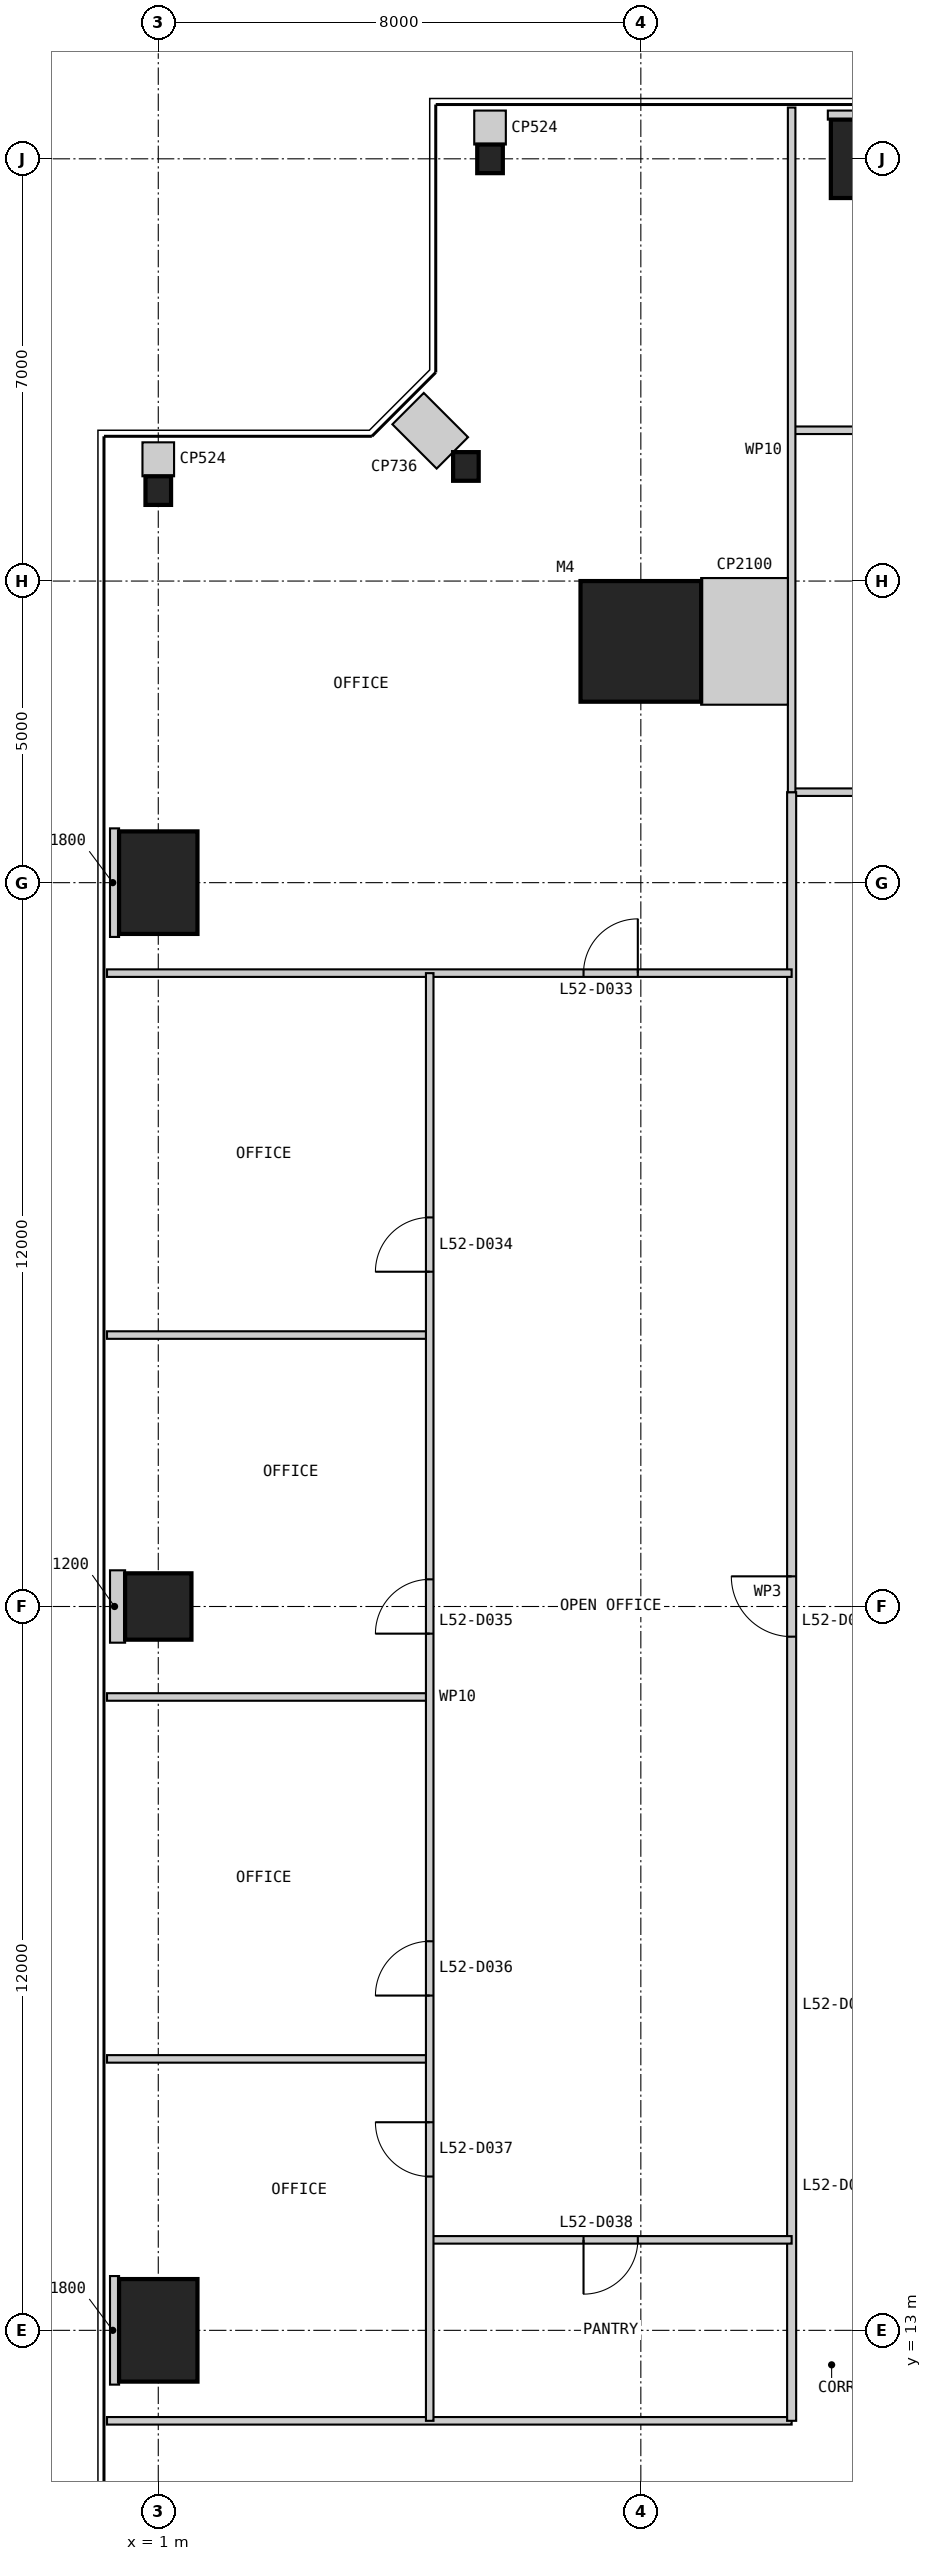
"""IFC4 building model, lengths in metres.
Left out: names, types, materials, properties, quantities, classifications, styles, units other than length and angle.
Written with IfcOpenShell. Run it as: python <this file> out.ifc"""

import sys

from ifc_helpers import new_model, si_unit, direction, frame, frame_2d, origin, origin_2d, place, context, subcontext, project, spatial, rectangle, i_section, extrude, element, fill, save


model = new_model("IFC4")
c1 = context("Model", 3, precision=1e-05, world=origin(), true_north=direction((0.0, 1.0)))
c2 = subcontext(c1, "Body", "Model", "MODEL_VIEW")
j1 = project(units=[si_unit("LENGTHUNIT", "METRE"), si_unit("PLANEANGLEUNIT", "RADIAN")], contexts=[c1])
p1 = place(None, origin())
s1 = spatial("IfcSite", under=j1, at=p1, CompositionType="ELEMENT")
p2 = place(p1, origin())
s2 = spatial("IfcBuilding", under=s1, at=p2, CompositionType="ELEMENT")
p3 = place(p2, frame((0.0, 0.0, 221.8)))
s3 = spatial("IfcBuildingStorey", under=s2, at=p3, CompositionType="ELEMENT", Elevation=221.8)
p4 = place(p3, frame((9.0, 41.0, 0.0), z_axis=(0.0, 0.0, 1.0), x_axis=(1.0, 0.0, 0.0)))
e1 = element("IfcColumn", 1, at=p4, inside=s3, PredefinedType="COLUMN", context=c2, shape_type="SweptSolid", body=[
    extrude(rectangle(XDim=2.0, YDim=2.0, at=origin_2d()), origin(), (0.0, 0.0, 1.0), 4.0),
])
p5 = place(p3, frame((13.0, 49.0, 0.0), z_axis=(0.0, 0.0, 1.0), x_axis=(1.0, 0.0, 0.0)))
e2 = element("IfcColumn", 2, at=p5, inside=s3, PredefinedType="COLUMN", context=c2, shape_type="SweptSolid", body=[
    extrude(rectangle(XDim=1.7, YDim=1.3, at=origin_2d()), origin(), (0.0, 0.0, 1.0), 4.0),
])
for number, where, z_axis, x_axis in (
    (3, (6.5, 49.0, 0.0), (0.0, 0.0, 1.0), (1.0, 0.0, 0.0)),
    (4, (6.1, 43.9, 0.0), (0.0, 0.0, 1.0), (1.0, 0.0, 0.0)),
    (5, (1.0, 43.5, 0.0), (0.0, 0.0, 1.0), (1.0, 0.0, 0.0)),
):
    element("IfcColumn", number, at=place(p3, frame(where, z_axis=z_axis, x_axis=x_axis)), inside=s3, PredefinedType="COLUMN", context=c2, shape_type="SweptSolid", body=[
        extrude(i_section(OverallWidth=0.424, OverallDepth=0.475, WebThickness=0.048, FlangeThickness=0.077, at=origin_2d()), origin(), (0.0, 0.0, 1.0), 4.0),
    ])
p6 = place(p3, frame((1.0, 37.0, 0.0), z_axis=(0.0, 0.0, 1.0), x_axis=(1.0, 0.0, 0.0)))
e6 = element("IfcColumn", 6, at=p6, inside=s3, PredefinedType="COLUMN", context=c2, shape_type="SweptSolid", body=[
    extrude(rectangle(XDim=1.3, YDim=1.7, at=origin_2d()), origin(), (0.0, 0.0, 1.0), 4.0),
])
p7 = place(p3, frame((1.0, 25.0, 0.0), z_axis=(0.0, 0.0, 1.0), x_axis=(1.0, 0.0, 0.0)))
e7 = element("IfcColumn", 7, at=p7, inside=s3, PredefinedType="COLUMN", context=c2, shape_type="SweptSolid", body=[
    extrude(rectangle(XDim=1.1, YDim=1.1, at=origin_2d()), origin(), (0.0, 0.0, 1.0), 4.0),
])
p8 = place(p3, frame((1.0, 13.0, 0.0), z_axis=(0.0, 0.0, 1.0), x_axis=(1.0, 0.0, 0.0)))
e8 = element("IfcColumn", 8, at=p8, inside=s3, PredefinedType="COLUMN", context=c2, shape_type="SweptSolid", body=[
    extrude(rectangle(XDim=1.3, YDim=1.7, at=origin_2d()), origin(), (0.0, 0.0, 1.0), 4.0),
])
p9 = place(p3, frame((0.15, 11.5, 0.0), z_axis=(0.0, 0.0, 1.0), x_axis=(1.0, 0.0, 0.0)))
e9 = element("IfcWall", 9, at=p9, inside=s3, PredefinedType="PARTITIONING", context=c2, shape_type="SweptSolid", body=[
    extrude(rectangle(XDim=11.35, YDim=0.125, at=frame_2d((5.675, 0.0))), origin(), (0.0, 0.0, 1.0), 3.85),
])
p10 = place(p3, frame((17.5, 44.5, 0.0), z_axis=(0.0, 0.0, 1.0), x_axis=(-1.0, 0.0, 0.0)))
e10 = element("IfcWall", 10, at=p10, inside=s3, PredefinedType="PARTITIONING", context=c2, shape_type="SweptSolid", body=[
    extrude(rectangle(XDim=6.0, YDim=0.125, at=frame_2d((3.0, 0.0))), origin(), (0.0, 0.0, 1.0), 3.85),
])
p11 = place(p3, frame((14.5, 38.5, 0.0), z_axis=(0.0, 0.0, 1.0), x_axis=(-1.0, 0.0, 0.0)))
e11 = element("IfcWall", 11, at=p11, inside=s3, PredefinedType="PARTITIONING", context=c2, shape_type="SweptSolid", body=[
    extrude(rectangle(XDim=3.0, YDim=0.125, at=frame_2d((1.5, 0.0))), origin(), (0.0, 0.0, 1.0), 3.85),
])
p12 = place(p3, frame((11.5, 38.5, 0.0), z_axis=(0.0, 0.0, 1.0), x_axis=(0.0, -1.0, 0.0)))
e12 = element("IfcWall", 12, at=p12, inside=s3, PredefinedType="PARTITIONING", context=c2, shape_type="SweptSolid", body=[
    extrude(rectangle(XDim=27.0, YDim=0.15, at=frame_2d((13.5, 0.0))), origin(), (0.0, 0.0, 1.0), 3.85),
])
p13 = place(p12, frame((13.0, 0.0, 0.0)))
e13 = element("IfcOpeningElement", 13, at=p13, cuts=e12, PredefinedType="OPENING", context=c2, shape_type="SweptSolid", body=[
    extrude(rectangle(XDim=1.0, YDim=2.2, at=frame_2d((0.5, 1.1))), frame((0.0, 0.085, 0.0), z_axis=(0.0, -1.0, 0.0), x_axis=(1.0, 0.0, 0.0)), (0.0, 0.0, 1.0), 0.17),
])
p14 = place(p3, frame((11.5, 49.85, 0.0), z_axis=(0.0, 0.0, 1.0), x_axis=(0.0, -1.0, 0.0)))
e14 = element("IfcWall", 14, at=p14, inside=s3, PredefinedType="PARTITIONING", context=c2, shape_type="SweptSolid", body=[
    extrude(rectangle(XDim=11.35, YDim=0.125, at=frame_2d((5.675, 0.0))), origin(), (0.0, 0.0, 1.0), 3.85),
])
p15 = place(p3, frame((0.15, 35.5, 0.0), z_axis=(0.0, 0.0, 1.0), x_axis=(1.0, 0.0, 0.0)))
e15 = element("IfcWall", 15, at=p15, inside=s3, PredefinedType="PARTITIONING", context=c2, shape_type="SweptSolid", body=[
    extrude(rectangle(XDim=11.35, YDim=0.125, at=frame_2d((5.675, 0.0))), origin(), (0.0, 0.0, 1.0), 3.85),
])
p16 = place(p15, frame((7.9, 0.0, 0.0)))
e16 = element("IfcOpeningElement", 16, at=p16, cuts=e15, PredefinedType="OPENING", context=c2, shape_type="SweptSolid", body=[
    extrude(rectangle(XDim=0.9, YDim=2.2, at=frame_2d((0.45, 1.1))), frame((0.0, 0.073, 0.0), z_axis=(0.0, -1.0, 0.0), x_axis=(1.0, 0.0, 0.0)), (0.0, 0.0, 1.0), 0.145),
])
for number, where, z_axis, x_axis in (
    (17, (0.15, 29.5, 0.0), (0.0, 0.0, 1.0), (1.0, 0.0, 0.0)),
    (18, (0.15, 23.5, 0.0), (0.0, 0.0, 1.0), (1.0, 0.0, 0.0)),
    (19, (0.15, 17.5, 0.0), (0.0, 0.0, 1.0), (1.0, 0.0, 0.0)),
):
    element("IfcWall", number, at=place(p3, frame(where, z_axis=z_axis, x_axis=x_axis)), inside=s3, PredefinedType="PARTITIONING", context=c2, shape_type="SweptSolid", body=[
        extrude(rectangle(XDim=5.35, YDim=0.125, at=frame_2d((2.675, 0.0))), origin(), (0.0, 0.0, 1.0), 3.85),
    ])
p17 = place(p3, frame((5.5, 14.5, 0.0), z_axis=(0.0, 0.0, 1.0), x_axis=(1.0, 0.0, 0.0)))
e20 = element("IfcWall", 20, at=p17, inside=s3, PredefinedType="PARTITIONING", context=c2, shape_type="SweptSolid", body=[
    extrude(rectangle(XDim=6.0, YDim=0.125, at=frame_2d((3.0, 0.0))), origin(), (0.0, 0.0, 1.0), 3.85),
])
p18 = place(p17, frame((2.55, 0.0, 0.0)))
e21 = element("IfcOpeningElement", 21, at=p18, cuts=e20, PredefinedType="OPENING", context=c2, shape_type="SweptSolid", body=[
    extrude(rectangle(XDim=0.9, YDim=2.2, at=frame_2d((0.45, 1.1))), frame((0.0, 0.073, 0.0), z_axis=(0.0, -1.0, 0.0), x_axis=(1.0, 0.0, 0.0)), (0.0, 0.0, 1.0), 0.145),
])
p19 = place(p3, frame((5.5, 35.5, 0.0), z_axis=(0.0, 0.0, 1.0), x_axis=(0.0, -1.0, 0.0)))
e22 = element("IfcWall", 22, at=p19, inside=s3, PredefinedType="PARTITIONING", context=c2, shape_type="SweptSolid", body=[
    extrude(rectangle(XDim=24.0, YDim=0.125, at=frame_2d((12.0, 0.0))), origin(), (0.0, 0.0, 1.0), 3.85),
])
p20 = place(p19, frame((4.05, 0.0, 0.0)))
e23 = element("IfcOpeningElement", 23, at=p20, cuts=e22, PredefinedType="OPENING", context=c2, shape_type="SweptSolid", body=[
    extrude(rectangle(XDim=0.9, YDim=2.2, at=frame_2d((0.45, 1.1))), frame((0.0, 0.073, 0.0), z_axis=(0.0, -1.0, 0.0), x_axis=(1.0, 0.0, 0.0)), (0.0, 0.0, 1.0), 0.145),
])
p21 = place(p19, frame((10.05, 0.0, 0.0)))
e24 = element("IfcOpeningElement", 24, at=p21, cuts=e22, PredefinedType="OPENING", context=c2, shape_type="SweptSolid", body=[
    extrude(rectangle(XDim=0.9, YDim=2.2, at=frame_2d((0.45, 1.1))), frame((0.0, 0.073, 0.0), z_axis=(0.0, -1.0, 0.0), x_axis=(1.0, 0.0, 0.0)), (0.0, 0.0, 1.0), 0.145),
])
p22 = place(p19, frame((16.05, 0.0, 0.0)))
e25 = element("IfcOpeningElement", 25, at=p22, cuts=e22, PredefinedType="OPENING", context=c2, shape_type="SweptSolid", body=[
    extrude(rectangle(XDim=0.9, YDim=2.2, at=frame_2d((0.45, 1.1))), frame((0.0, 0.073, 0.0), z_axis=(0.0, -1.0, 0.0), x_axis=(1.0, 0.0, 0.0)), (0.0, 0.0, 1.0), 0.145),
])
p23 = place(p19, frame((19.05, 0.0, 0.0)))
e26 = element("IfcOpeningElement", 26, at=p23, cuts=e22, PredefinedType="OPENING", context=c2, shape_type="SweptSolid", body=[
    extrude(rectangle(XDim=0.9, YDim=2.2, at=frame_2d((0.45, 1.1))), frame((0.0, 0.073, 0.0), z_axis=(0.0, -1.0, 0.0), x_axis=(1.0, 0.0, 0.0)), (0.0, 0.0, 1.0), 0.145),
])
p24 = place(p3, frame((13.0, 49.8, 0.0), z_axis=(0.0, 0.0, 1.0), x_axis=(0.0, -1.0, 0.0)))
e27 = element("IfcWall", 27, at=p24, inside=s3, PredefinedType="PARTITIONING", context=c2, shape_type="SweptSolid", body=[
    extrude(rectangle(XDim=0.15, YDim=1.8, at=frame_2d((0.075, 0.0))), origin(), (0.0, 0.0, 1.0), 3.85),
])
p25 = place(p3, frame((11.438, 41.0, 0.0), z_axis=(0.0, 0.0, 1.0), x_axis=(-1.0, 0.0, 0.0)))
e28 = element("IfcWall", 28, at=p25, inside=s3, PredefinedType="PARTITIONING", context=c2, shape_type="SweptSolid", body=[
    extrude(rectangle(XDim=1.438, YDim=2.1, at=frame_2d((0.719, 0.0))), origin(), (0.0, 0.0, 1.0), 3.85),
])
p26 = place(p3, frame((6.5, 49.8, 0.0), z_axis=(0.0, 0.0, 1.0), x_axis=(0.0, -1.0, 0.0)))
e29 = element("IfcWall", 29, at=p26, inside=s3, PredefinedType="PARTITIONING", context=c2, shape_type="SweptSolid", body=[
    extrude(rectangle(XDim=0.562, YDim=0.524, at=frame_2d((0.281, 0.0))), origin(), (0.0, 0.0, 1.0), 3.85),
])
p27 = place(p3, frame((5.141, 44.859, 0.0), z_axis=(0.0, 0.0, 1.0), x_axis=(0.707106781187, -0.707106781187, 0.0)))
e30 = element("IfcWall", 30, at=p27, inside=s3, PredefinedType="PARTITIONING", context=c2, shape_type="SweptSolid", body=[
    extrude(rectangle(XDim=1.038, YDim=0.736, at=frame_2d((0.519, 0.0))), origin(), (0.0, 0.0, 1.0), 3.85),
])
p28 = place(p3, frame((1.0, 44.3, 0.0), z_axis=(0.0, 0.0, 1.0), x_axis=(0.0, -1.0, 0.0)))
e31 = element("IfcWall", 31, at=p28, inside=s3, PredefinedType="PARTITIONING", context=c2, shape_type="SweptSolid", body=[
    extrude(rectangle(XDim=0.562, YDim=0.524, at=frame_2d((0.281, 0.0))), origin(), (0.0, 0.0, 1.0), 3.85),
])
p29 = place(p3, frame((0.2, 37.0, 0.0), z_axis=(0.0, 0.0, 1.0), x_axis=(1.0, 0.0, 0.0)))
e32 = element("IfcWall", 32, at=p29, inside=s3, PredefinedType="PARTITIONING", context=c2, shape_type="SweptSolid", body=[
    extrude(rectangle(XDim=0.15, YDim=1.8, at=frame_2d((0.075, 0.0))), origin(), (0.0, 0.0, 1.0), 3.85),
])
p30 = place(p3, frame((0.2, 25.0, 0.0), z_axis=(0.0, 0.0, 1.0), x_axis=(1.0, 0.0, 0.0)))
e33 = element("IfcWall", 33, at=p30, inside=s3, PredefinedType="PARTITIONING", context=c2, shape_type="SweptSolid", body=[
    extrude(rectangle(XDim=0.25, YDim=1.2, at=frame_2d((0.125, 0.0))), origin(), (0.0, 0.0, 1.0), 3.85),
])
p31 = place(p3, frame((0.2, 13.0, 0.0), z_axis=(0.0, 0.0, 1.0), x_axis=(1.0, 0.0, 0.0)))
e34 = element("IfcWall", 34, at=p31, inside=s3, PredefinedType="PARTITIONING", context=c2, shape_type="SweptSolid", body=[
    extrude(rectangle(XDim=0.15, YDim=1.8, at=frame_2d((0.075, 0.0))), origin(), (0.0, 0.0, 1.0), 3.85),
])
p32 = place(p13, frame((1.0, 0.0, 0.0), z_axis=(0.0, 0.0, 1.0), x_axis=(-1.0, 0.0, 0.0)))
e35 = element("IfcDoor", 35, at=p32, inside=s3, OperationType="SINGLE_SWING_RIGHT", PredefinedType="DOOR", context=c2, shape_type="SweptSolid", body=[
    extrude(rectangle(XDim=1.0, YDim=2.2, at=frame_2d((0.5, 1.1))), frame((0.0, 0.025, 0.0), z_axis=(0.0, -1.0, 0.0), x_axis=(1.0, 0.0, 0.0)), (0.0, 0.0, 1.0), 0.05),
])
fill(e13, e35)
p33 = place(p16, origin())
e36 = element("IfcDoor", 36, at=p33, inside=s3, OperationType="SINGLE_SWING_RIGHT", PredefinedType="DOOR", context=c2, shape_type="SweptSolid", body=[
    extrude(rectangle(XDim=0.9, YDim=2.2, at=frame_2d((0.45, 1.1))), frame((0.0, 0.025, 0.0), z_axis=(0.0, -1.0, 0.0), x_axis=(1.0, 0.0, 0.0)), (0.0, 0.0, 1.0), 0.05),
])
fill(e16, e36)
p34 = place(p20, frame((0.9, 0.0, 0.0), z_axis=(0.0, 0.0, 1.0), x_axis=(-1.0, 0.0, 0.0)))
e37 = element("IfcDoor", 37, at=p34, inside=s3, OperationType="SINGLE_SWING_LEFT", PredefinedType="DOOR", context=c2, shape_type="SweptSolid", body=[
    extrude(rectangle(XDim=0.9, YDim=2.2, at=frame_2d((0.45, 1.1))), frame((0.0, 0.025, 0.0), z_axis=(0.0, -1.0, 0.0), x_axis=(1.0, 0.0, 0.0)), (0.0, 0.0, 1.0), 0.05),
])
fill(e23, e37)
p35 = place(p21, frame((0.9, 0.0, 0.0), z_axis=(0.0, 0.0, 1.0), x_axis=(-1.0, 0.0, 0.0)))
e38 = element("IfcDoor", 38, at=p35, inside=s3, OperationType="SINGLE_SWING_LEFT", PredefinedType="DOOR", context=c2, shape_type="SweptSolid", body=[
    extrude(rectangle(XDim=0.9, YDim=2.2, at=frame_2d((0.45, 1.1))), frame((0.0, 0.025, 0.0), z_axis=(0.0, -1.0, 0.0), x_axis=(1.0, 0.0, 0.0)), (0.0, 0.0, 1.0), 0.05),
])
fill(e24, e38)
p36 = place(p22, frame((0.9, 0.0, 0.0), z_axis=(0.0, 0.0, 1.0), x_axis=(-1.0, 0.0, 0.0)))
e39 = element("IfcDoor", 39, at=p36, inside=s3, OperationType="SINGLE_SWING_LEFT", PredefinedType="DOOR", context=c2, shape_type="SweptSolid", body=[
    extrude(rectangle(XDim=0.9, YDim=2.2, at=frame_2d((0.45, 1.1))), frame((0.0, 0.025, 0.0), z_axis=(0.0, -1.0, 0.0), x_axis=(1.0, 0.0, 0.0)), (0.0, 0.0, 1.0), 0.05),
])
fill(e25, e39)
p37 = place(p23, frame((0.9, 0.0, 0.0), z_axis=(0.0, 0.0, 1.0), x_axis=(-1.0, 0.0, 0.0)))
e40 = element("IfcDoor", 40, at=p37, inside=s3, OperationType="SINGLE_SWING_RIGHT", PredefinedType="DOOR", context=c2, shape_type="SweptSolid", body=[
    extrude(rectangle(XDim=0.9, YDim=2.2, at=frame_2d((0.45, 1.1))), frame((0.0, 0.025, 0.0), z_axis=(0.0, -1.0, 0.0), x_axis=(1.0, 0.0, 0.0)), (0.0, 0.0, 1.0), 0.05),
])
fill(e26, e40)
p38 = place(p18, frame((0.9, 0.0, 0.0), z_axis=(0.0, 0.0, 1.0), x_axis=(-1.0, 0.0, 0.0)))
e41 = element("IfcDoor", 41, at=p38, inside=s3, OperationType="SINGLE_SWING_RIGHT", PredefinedType="DOOR", context=c2, shape_type="SweptSolid", body=[
    extrude(rectangle(XDim=0.9, YDim=2.2, at=frame_2d((0.45, 1.1))), frame((0.0, 0.025, 0.0), z_axis=(0.0, -1.0, 0.0), x_axis=(1.0, 0.0, 0.0)), (0.0, 0.0, 1.0), 0.05),
])
fill(e21, e41)
save(model, sys.argv[1])
